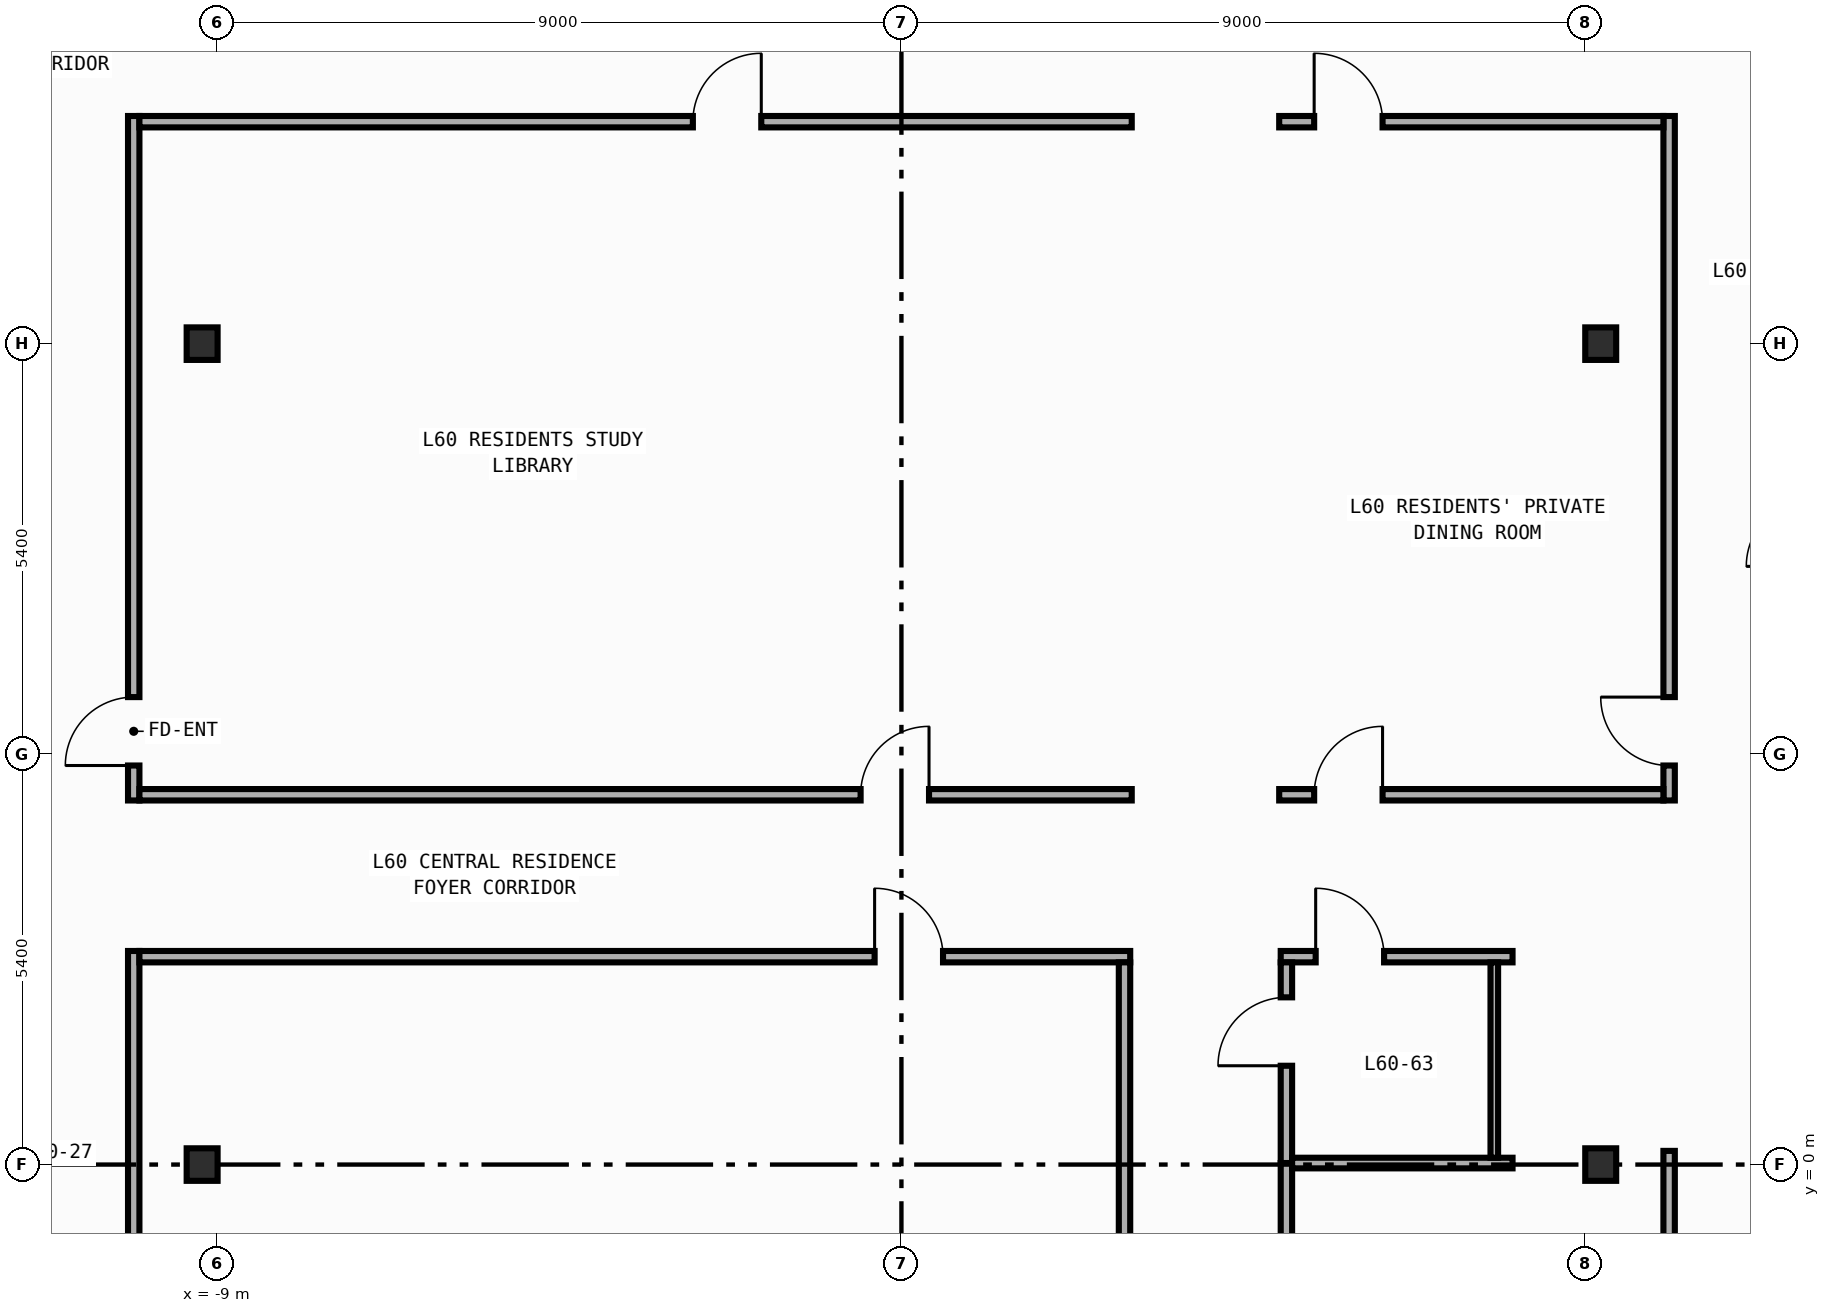
"""IFC4 building model, lengths in metres.
Left out: names, types, materials, properties, quantities, classifications, styles, units other than length and angle.
Written with IfcOpenShell. Run it as: python <this file> out.ifc"""

import sys

from ifc_helpers import new_model, si_unit, direction, frame, frame_2d, origin, origin_2d, place, context, subcontext, project, spatial, rectangle, i_section, extrude, element, fill, save


model = new_model("IFC4")
c1 = context("Model", 3, precision=1e-05, world=origin(), true_north=direction((0.0, 1.0)))
c2 = subcontext(c1, "Body", "Model", "MODEL_VIEW")
j1 = project(units=[si_unit("LENGTHUNIT", "METRE"), si_unit("PLANEANGLEUNIT", "RADIAN")], contexts=[c1])
p1 = place(None, origin())
s1 = spatial("IfcSite", under=j1, at=p1, CompositionType="ELEMENT")
p2 = place(p1, origin())
s2 = spatial("IfcBuilding", under=s1, at=p2, CompositionType="ELEMENT")
p3 = place(p2, frame((0.0, 0.0, 254.8)))
s3 = spatial("IfcBuildingStorey", under=s2, at=p3, CompositionType="ELEMENT", Elevation=254.8)
for number, where, z_axis, x_axis in (
    (1, (-9.2, 0.0, 0.0), (0.0, 0.0, 1.0), (1.0, 0.0, 0.0)),
    (2, (-9.2, 10.8, 0.0), (0.0, 0.0, 1.0), (1.0, 0.0, 0.0)),
    (3, (9.2, 0.0, 0.0), (0.0, 0.0, 1.0), (1.0, 0.0, 0.0)),
    (4, (9.2, 10.8, 0.0), (0.0, 0.0, 1.0), (1.0, 0.0, 0.0)),
):
    element("IfcColumn", number, at=place(p3, frame(where, z_axis=z_axis, x_axis=x_axis)), inside=s3, PredefinedType="COLUMN", context=c2, shape_type="SweptSolid", body=[
        extrude(i_section(OverallWidth=0.407, OverallDepth=0.428, WebThickness=0.02, FlangeThickness=0.035, FilletRadius=0.022, at=origin_2d()), origin(), (0.0, 0.0, 1.0), 3.6),
    ])
p4 = place(p3, frame((-10.1, 4.79, 0.0), z_axis=(0.0, 0.0, 1.0), x_axis=(0.0, 1.0, 0.0)))
e5 = element("IfcWall", 5, at=p4, inside=s3, PredefinedType="PARTITIONING", context=c2, shape_type="SweptSolid", body=[
    extrude(rectangle(XDim=9.005, YDim=0.15, at=frame_2d((4.502, 0.0))), origin(), (0.0, 0.0, 1.0), 3.34),
])
p5 = place(p4, frame((0.46, 0.0, 0.0)))
e6 = element("IfcOpeningElement", 6, at=p5, cuts=e5, PredefinedType="OPENING", context=c2, shape_type="SweptSolid", body=[
    extrude(rectangle(XDim=0.9, YDim=2.15, at=frame_2d((0.45, 1.075))), frame((0.0, 0.085, 0.0), z_axis=(0.0, -1.0, 0.0), x_axis=(1.0, 0.0, 0.0)), (0.0, 0.0, 1.0), 0.17),
])
p6 = place(p3, frame((-10.1, -13.795, 0.0), z_axis=(0.0, 0.0, 1.0), x_axis=(0.0, 1.0, 0.0)))
e7 = element("IfcWall", 7, at=p6, inside=s3, PredefinedType="PARTITIONING", context=c2, shape_type="SweptSolid", body=[
    extrude(rectangle(XDim=16.605, YDim=0.15, at=frame_2d((8.302, 0.0))), origin(), (0.0, 0.0, 1.0), 3.34),
])
p7 = place(p6, frame((7.954, 0.0, 0.0)))
e8 = element("IfcOpeningElement", 8, at=p7, cuts=e7, PredefinedType="OPENING", context=c2, shape_type="SweptSolid", body=[
    extrude(rectangle(XDim=0.9, YDim=2.15, at=frame_2d((0.45, 1.075))), frame((0.0, 0.085, 0.0), z_axis=(0.0, -1.0, 0.0), x_axis=(1.0, 0.0, 0.0)), (0.0, 0.0, 1.0), 0.17),
])
p8 = place(p3, frame((10.1, 4.79, 0.0), z_axis=(0.0, 0.0, 1.0), x_axis=(0.0, 1.0, 0.0)))
e9 = element("IfcWall", 9, at=p8, inside=s3, PredefinedType="PARTITIONING", context=c2, shape_type="SweptSolid", body=[
    extrude(rectangle(XDim=9.005, YDim=0.15, at=frame_2d((4.502, 0.0))), origin(), (0.0, 0.0, 1.0), 3.34),
])
p9 = place(p8, frame((0.46, 0.0, 0.0)))
e10 = element("IfcOpeningElement", 10, at=p9, cuts=e9, PredefinedType="OPENING", context=c2, shape_type="SweptSolid", body=[
    extrude(rectangle(XDim=0.9, YDim=2.15, at=frame_2d((0.45, 1.075))), frame((0.0, 0.085, 0.0), z_axis=(0.0, -1.0, 0.0), x_axis=(1.0, 0.0, 0.0)), (0.0, 0.0, 1.0), 0.17),
])
p10 = place(p3, frame((10.1, -13.795, 0.0), z_axis=(0.0, 0.0, 1.0), x_axis=(0.0, 1.0, 0.0)))
e11 = element("IfcWall", 11, at=p10, inside=s3, PredefinedType="PARTITIONING", context=c2, shape_type="SweptSolid", body=[
    extrude(rectangle(XDim=13.975, YDim=0.15, at=frame_2d((6.987, 0.0))), origin(), (0.0, 0.0, 1.0), 3.34),
])
p11 = place(p10, frame((7.956, 0.0, 0.0)))
e12 = element("IfcOpeningElement", 12, at=p11, cuts=e11, PredefinedType="OPENING", context=c2, shape_type="SweptSolid", body=[
    extrude(rectangle(XDim=0.9, YDim=2.15, at=frame_2d((0.45, 1.075))), frame((0.0, 0.085, 0.0), z_axis=(0.0, -1.0, 0.0), x_axis=(1.0, 0.0, 0.0)), (0.0, 0.0, 1.0), 0.17),
])
p12 = place(p3, frame((-10.025, 4.865, 0.0), z_axis=(0.0, 0.0, 1.0), x_axis=(1.0, 0.0, 0.0)))
e13 = element("IfcWall", 13, at=p12, inside=s3, PredefinedType="PARTITIONING", context=c2, shape_type="SweptSolid", body=[
    extrude(rectangle(XDim=13.055, YDim=0.15, at=frame_2d((6.527, 0.0))), origin(), (0.0, 0.0, 1.0), 3.34),
])
p13 = place(p12, frame((9.488, 0.0, 0.0)))
e14 = element("IfcOpeningElement", 14, at=p13, cuts=e13, PredefinedType="OPENING", context=c2, shape_type="SweptSolid", body=[
    extrude(rectangle(XDim=0.9, YDim=2.15, at=frame_2d((0.45, 1.075))), frame((0.0, 0.085, 0.0), z_axis=(0.0, -1.0, 0.0), x_axis=(1.0, 0.0, 0.0)), (0.0, 0.0, 1.0), 0.17),
])
p14 = place(p3, frame((-10.025, 2.735, 0.0), z_axis=(0.0, 0.0, 1.0), x_axis=(1.0, 0.0, 0.0)))
e15 = element("IfcWall", 15, at=p14, inside=s3, PredefinedType="PARTITIONING", context=c2, shape_type="SweptSolid", body=[
    extrude(rectangle(XDim=13.035, YDim=0.15, at=frame_2d((6.518, 0.0))), origin(), (0.0, 0.0, 1.0), 3.34),
])
p15 = place(p14, frame((9.672, 0.0, 0.0)))
e16 = element("IfcOpeningElement", 16, at=p15, cuts=e15, PredefinedType="OPENING", context=c2, shape_type="SweptSolid", body=[
    extrude(rectangle(XDim=0.9, YDim=2.15, at=frame_2d((0.45, 1.075))), frame((0.0, 0.085, 0.0), z_axis=(0.0, -1.0, 0.0), x_axis=(1.0, 0.0, 0.0)), (0.0, 0.0, 1.0), 0.17),
])
p16 = place(p3, frame((4.97, 4.865, 0.0), z_axis=(0.0, 0.0, 1.0), x_axis=(1.0, 0.0, 0.0)))
e17 = element("IfcWall", 17, at=p16, inside=s3, PredefinedType="PARTITIONING", context=c2, shape_type="SweptSolid", body=[
    extrude(rectangle(XDim=5.055, YDim=0.15, at=frame_2d((2.527, 0.0))), origin(), (0.0, 0.0, 1.0), 3.34),
])
p17 = place(p16, frame((0.46, 0.0, 0.0)))
e18 = element("IfcOpeningElement", 18, at=p17, cuts=e17, PredefinedType="OPENING", context=c2, shape_type="SweptSolid", body=[
    extrude(rectangle(XDim=0.9, YDim=2.15, at=frame_2d((0.45, 1.075))), frame((0.0, 0.085, 0.0), z_axis=(0.0, -1.0, 0.0), x_axis=(1.0, 0.0, 0.0)), (0.0, 0.0, 1.0), 0.17),
])
p18 = place(p3, frame((4.99, 2.735, 0.0), z_axis=(0.0, 0.0, 1.0), x_axis=(1.0, 0.0, 0.0)))
e19 = element("IfcWall", 19, at=p18, inside=s3, PredefinedType="PARTITIONING", context=c2, shape_type="SweptSolid", body=[
    extrude(rectangle(XDim=3.05, YDim=0.15, at=frame_2d((1.525, 0.0))), origin(), (0.0, 0.0, 1.0), 3.34),
])
p19 = place(p18, frame((0.46, 0.0, 0.0)))
e20 = element("IfcOpeningElement", 20, at=p19, cuts=e19, PredefinedType="OPENING", context=c2, shape_type="SweptSolid", body=[
    extrude(rectangle(XDim=0.9, YDim=2.15, at=frame_2d((0.45, 1.075))), frame((0.0, 0.085, 0.0), z_axis=(0.0, -1.0, 0.0), x_axis=(1.0, 0.0, 0.0)), (0.0, 0.0, 1.0), 0.17),
])
p20 = place(p3, frame((2.935, -13.795, 0.0), z_axis=(0.0, 0.0, 1.0), x_axis=(0.0, 1.0, 0.0)))
e21 = element("IfcWall", 21, at=p20, inside=s3, PredefinedType="PARTITIONING", context=c2, shape_type="SweptSolid", body=[
    extrude(rectangle(XDim=16.455, YDim=0.15, at=frame_2d((8.228, 0.0))), origin(), (0.0, 0.0, 1.0), 3.34),
])
p21 = place(p20, frame((7.878, 0.0, 0.0)))
e22 = element("IfcOpeningElement", 22, at=p21, cuts=e21, PredefinedType="OPENING", context=c2, shape_type="SweptSolid", body=[
    extrude(rectangle(XDim=0.9, YDim=2.15, at=frame_2d((0.45, 1.075))), frame((0.0, 0.085, 0.0), z_axis=(0.0, -1.0, 0.0), x_axis=(1.0, 0.0, 0.0)), (0.0, 0.0, 1.0), 0.17),
])
p22 = place(p3, frame((5.065, 0.02, 0.0), z_axis=(0.0, 0.0, 1.0), x_axis=(0.0, 1.0, 0.0)))
e23 = element("IfcWall", 23, at=p22, inside=s3, PredefinedType="PARTITIONING", context=c2, shape_type="SweptSolid", body=[
    extrude(rectangle(XDim=2.64, YDim=0.15, at=frame_2d((1.32, 0.0))), origin(), (0.0, 0.0, 1.0), 2.99),
])
p23 = place(p22, frame((1.28, 0.0, 0.0)))
e24 = element("IfcOpeningElement", 24, at=p23, cuts=e23, PredefinedType="OPENING", context=c2, shape_type="SweptSolid", body=[
    extrude(rectangle(XDim=0.9, YDim=2.15, at=frame_2d((0.45, 1.075))), frame((0.0, 0.085, 0.0), z_axis=(0.0, -1.0, 0.0), x_axis=(1.0, 0.0, 0.0)), (0.0, 0.0, 1.0), 0.17),
])
p24 = place(p3, frame((5.065, -13.795, 0.0), z_axis=(0.0, 0.0, 1.0), x_axis=(0.0, 1.0, 0.0)))
e25 = element("IfcWall", 25, at=p24, inside=s3, PredefinedType="PARTITIONING", context=c2, shape_type="SweptSolid", body=[
    extrude(rectangle(XDim=13.815, YDim=0.15, at=frame_2d((6.907, 0.0))), origin(), (0.0, 0.0, 1.0), 2.99),
])
p25 = place(p24, frame((7.982, 0.0, 0.0)))
e26 = element("IfcOpeningElement", 26, at=p25, cuts=e25, PredefinedType="OPENING", context=c2, shape_type="SweptSolid", body=[
    extrude(rectangle(XDim=0.9, YDim=2.15, at=frame_2d((0.45, 1.075))), frame((0.0, 0.085, 0.0), z_axis=(0.0, -1.0, 0.0), x_axis=(1.0, 0.0, 0.0)), (0.0, 0.0, 1.0), 0.17),
])
p26 = place(p3, frame((-10.025, 13.72, 0.0), z_axis=(0.0, 0.0, 1.0), x_axis=(1.0, 0.0, 0.0)))
e27 = element("IfcWall", 27, at=p26, inside=s3, PredefinedType="PARTITIONING", context=c2, shape_type="SweptSolid", body=[
    extrude(rectangle(XDim=13.055, YDim=0.15, at=frame_2d((6.527, 0.0))), origin(), (0.0, 0.0, 1.0), 3.34),
])
p27 = place(p26, frame((7.281, 0.0, 0.0)))
e28 = element("IfcOpeningElement", 28, at=p27, cuts=e27, PredefinedType="OPENING", context=c2, shape_type="SweptSolid", body=[
    extrude(rectangle(XDim=0.9, YDim=2.15, at=frame_2d((0.45, 1.075))), frame((0.0, 0.085, 0.0), z_axis=(0.0, -1.0, 0.0), x_axis=(1.0, 0.0, 0.0)), (0.0, 0.0, 1.0), 0.17),
])
p28 = place(p3, frame((4.97, 13.72, 0.0), z_axis=(0.0, 0.0, 1.0), x_axis=(1.0, 0.0, 0.0)))
e29 = element("IfcWall", 29, at=p28, inside=s3, PredefinedType="PARTITIONING", context=c2, shape_type="SweptSolid", body=[
    extrude(rectangle(XDim=5.055, YDim=0.15, at=frame_2d((2.527, 0.0))), origin(), (0.0, 0.0, 1.0), 3.34),
])
p29 = place(p28, frame((0.46, 0.0, 0.0)))
e30 = element("IfcOpeningElement", 30, at=p29, cuts=e29, PredefinedType="OPENING", context=c2, shape_type="SweptSolid", body=[
    extrude(rectangle(XDim=0.9, YDim=2.15, at=frame_2d((0.45, 1.075))), frame((0.0, 0.085, 0.0), z_axis=(0.0, -1.0, 0.0), x_axis=(1.0, 0.0, 0.0)), (0.0, 0.0, 1.0), 0.17),
])
p30 = place(p3, frame((5.14, 0.02, 0.0), z_axis=(0.0, 0.0, 1.0), x_axis=(1.0, 0.0, 0.0)))
e31 = element("IfcWall", 31, at=p30, inside=s3, PredefinedType="PARTITIONING", context=c2, shape_type="SweptSolid", body=[
    extrude(rectangle(XDim=2.9, YDim=0.14, at=frame_2d((1.45, 0.0))), origin(), (0.0, 0.0, 1.0), 2.44),
])
p31 = place(p3, frame((7.8, 2.66, 0.0), z_axis=(0.0, 0.0, 1.0), x_axis=(0.0, -1.0, 0.0)))
e32 = element("IfcWall", 32, at=p31, inside=s3, PredefinedType="PARTITIONING", context=c2, shape_type="SweptSolid", body=[
    extrude(rectangle(XDim=2.57, YDim=0.1, at=frame_2d((1.285, 0.0))), origin(), (0.0, 0.0, 1.0), 3.34),
])
p32 = place(p5, origin())
e33 = element("IfcDoor", 33, at=p32, inside=s3, OperationType="SINGLE_SWING_LEFT", PredefinedType="DOOR", context=c2, shape_type="SweptSolid", body=[
    extrude(rectangle(XDim=0.9, YDim=2.15, at=frame_2d((0.45, 1.075))), frame((0.0, 0.025, 0.0), z_axis=(0.0, -1.0, 0.0), x_axis=(1.0, 0.0, 0.0)), (0.0, 0.0, 1.0), 0.05),
])
fill(e6, e33)
p33 = place(p9, origin())
e34 = element("IfcDoor", 34, at=p33, inside=s3, OperationType="SINGLE_SWING_RIGHT", PredefinedType="DOOR", context=c2, shape_type="SweptSolid", body=[
    extrude(rectangle(XDim=0.9, YDim=2.15, at=frame_2d((0.45, 1.075))), frame((0.0, 0.025, 0.0), z_axis=(0.0, -1.0, 0.0), x_axis=(1.0, 0.0, 0.0)), (0.0, 0.0, 1.0), 0.05),
])
fill(e10, e34)
p34 = place(p13, origin())
e35 = element("IfcDoor", 35, at=p34, inside=s3, OperationType="SINGLE_SWING_RIGHT", PredefinedType="DOOR", context=c2, shape_type="SweptSolid", body=[
    extrude(rectangle(XDim=0.9, YDim=2.15, at=frame_2d((0.45, 1.075))), frame((0.0, 0.025, 0.0), z_axis=(0.0, -1.0, 0.0), x_axis=(1.0, 0.0, 0.0)), (0.0, 0.0, 1.0), 0.05),
])
fill(e14, e35)
p35 = place(p15, origin())
e36 = element("IfcDoor", 36, at=p35, inside=s3, OperationType="SINGLE_SWING_LEFT", PredefinedType="DOOR", context=c2, shape_type="SweptSolid", body=[
    extrude(rectangle(XDim=0.9, YDim=2.15, at=frame_2d((0.45, 1.075))), frame((0.0, 0.025, 0.0), z_axis=(0.0, -1.0, 0.0), x_axis=(1.0, 0.0, 0.0)), (0.0, 0.0, 1.0), 0.05),
])
fill(e16, e36)
p36 = place(p17, origin())
e37 = element("IfcDoor", 37, at=p36, inside=s3, OperationType="SINGLE_SWING_RIGHT", PredefinedType="DOOR", context=c2, shape_type="SweptSolid", body=[
    extrude(rectangle(XDim=0.9, YDim=2.15, at=frame_2d((0.45, 1.075))), frame((0.0, 0.025, 0.0), z_axis=(0.0, -1.0, 0.0), x_axis=(1.0, 0.0, 0.0)), (0.0, 0.0, 1.0), 0.05),
])
fill(e18, e37)
p37 = place(p19, origin())
e38 = element("IfcDoor", 38, at=p37, inside=s3, OperationType="SINGLE_SWING_LEFT", PredefinedType="DOOR", context=c2, shape_type="SweptSolid", body=[
    extrude(rectangle(XDim=0.9, YDim=2.15, at=frame_2d((0.45, 1.075))), frame((0.0, 0.025, 0.0), z_axis=(0.0, -1.0, 0.0), x_axis=(1.0, 0.0, 0.0)), (0.0, 0.0, 1.0), 0.05),
])
fill(e20, e38)
p38 = place(p23, origin())
e39 = element("IfcDoor", 39, at=p38, inside=s3, OperationType="SINGLE_SWING_LEFT", PredefinedType="DOOR", context=c2, shape_type="SweptSolid", body=[
    extrude(rectangle(XDim=0.9, YDim=2.15, at=frame_2d((0.45, 1.075))), frame((0.0, 0.025, 0.0), z_axis=(0.0, -1.0, 0.0), x_axis=(1.0, 0.0, 0.0)), (0.0, 0.0, 1.0), 0.05),
])
fill(e24, e39)
p39 = place(p27, origin())
e40 = element("IfcDoor", 40, at=p39, inside=s3, OperationType="SINGLE_SWING_RIGHT", PredefinedType="DOOR", context=c2, shape_type="SweptSolid", body=[
    extrude(rectangle(XDim=0.9, YDim=2.15, at=frame_2d((0.45, 1.075))), frame((0.0, 0.025, 0.0), z_axis=(0.0, -1.0, 0.0), x_axis=(1.0, 0.0, 0.0)), (0.0, 0.0, 1.0), 0.05),
])
fill(e28, e40)
p40 = place(p29, origin())
e41 = element("IfcDoor", 41, at=p40, inside=s3, OperationType="SINGLE_SWING_LEFT", PredefinedType="DOOR", context=c2, shape_type="SweptSolid", body=[
    extrude(rectangle(XDim=0.9, YDim=2.15, at=frame_2d((0.45, 1.075))), frame((0.0, 0.025, 0.0), z_axis=(0.0, -1.0, 0.0), x_axis=(1.0, 0.0, 0.0)), (0.0, 0.0, 1.0), 0.05),
])
fill(e30, e41)
save(model, sys.argv[1])
